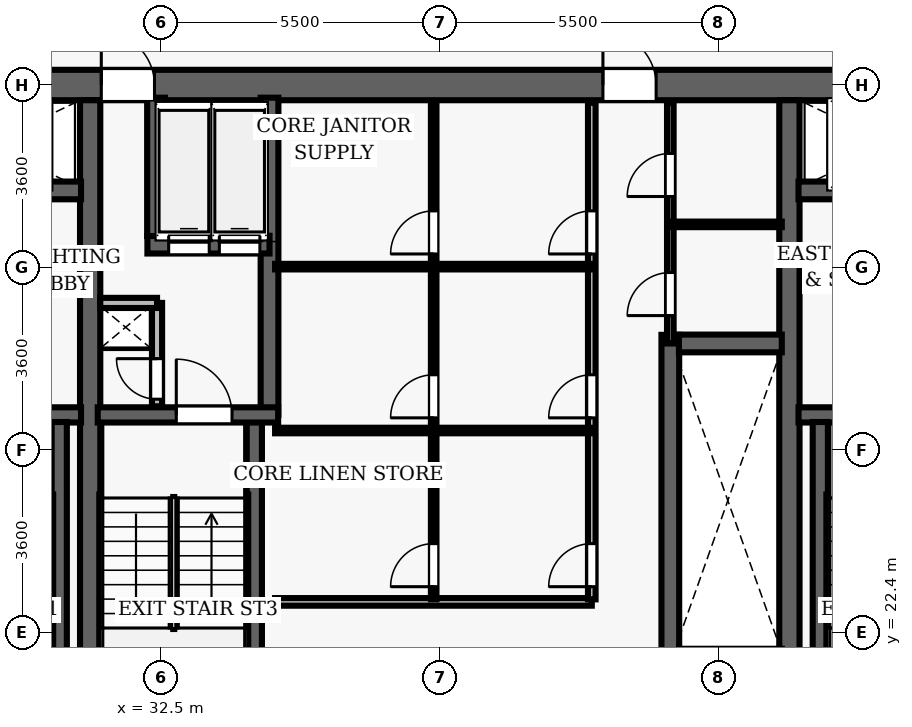
"""IFC4 building model, lengths in metres.
Left out: names, types, materials, properties, quantities, classifications, styles, units other than length and angle.
Written with IfcOpenShell. Run it as: python <this file> out.ifc"""

import sys

from ifc_helpers import new_model, si_unit, direction, frame, frame_2d, origin, place, context, subcontext, project, spatial, rectangle, extrude, element, fill, save


model = new_model("IFC4")
c1 = context("Model", 3, precision=1e-05, world=origin(), true_north=direction((0.0, 1.0)))
c2 = subcontext(c1, "Body", "Model", "MODEL_VIEW")
j1 = project(units=[si_unit("LENGTHUNIT", "METRE"), si_unit("PLANEANGLEUNIT", "RADIAN")], contexts=[c1])
p1 = place(None, origin())
s1 = spatial("IfcSite", under=j1, at=p1, CompositionType="ELEMENT")
p2 = place(p1, origin())
s2 = spatial("IfcBuilding", under=s1, at=p2, CompositionType="ELEMENT")
p3 = place(p2, frame((0.0, 0.0, 130.8)))
s3 = spatial("IfcBuildingStorey", under=s2, at=p3, CompositionType="ELEMENT", Elevation=130.8)
p4 = place(p3, frame((26.7, 33.2, 0.0), z_axis=(0.0, 0.0, 1.0), x_axis=(1.0, 0.0, 0.0)))
e1 = element("IfcWall", 1, at=p4, inside=s3, PredefinedType="SHEAR", context=c2, shape_type="SweptSolid", body=[
    extrude(rectangle(XDim=22.6, YDim=0.6, at=frame_2d((11.3, 0.0))), origin(), (0.0, 0.0, 1.0), 3.5),
])
p5 = place(p4, frame((4.62, 0.0, 0.0)))
e2 = element("IfcOpeningElement", 2, at=p5, cuts=e1, PredefinedType="OPENING", context=c2, shape_type="SweptSolid", body=[
    extrude(rectangle(XDim=1.05, YDim=2.15, at=frame_2d((0.525, 1.075))), frame((0.0, 0.31, 0.0), z_axis=(0.0, -1.0, 0.0), x_axis=(1.0, 0.0, 0.0)), (0.0, 0.0, 1.0), 0.62),
])
p6 = place(p4, frame((14.52, 0.0, 0.0)))
e3 = element("IfcOpeningElement", 3, at=p6, cuts=e1, PredefinedType="OPENING", context=c2, shape_type="SweptSolid", body=[
    extrude(rectangle(XDim=1.05, YDim=2.15, at=frame_2d((0.525, 1.075))), frame((0.0, 0.31, 0.0), z_axis=(0.0, -1.0, 0.0), x_axis=(1.0, 0.0, 0.0)), (0.0, 0.0, 1.0), 0.62),
])
for number, where, z_axis, x_axis in (
    (4, (31.1, 19.1, 0.0), (0.0, 0.0, 1.0), (0.0, 1.0, 0.0)),
    (5, (44.9, 19.1, 0.0), (0.0, 0.0, 1.0), (0.0, 1.0, 0.0)),
):
    element("IfcWall", number, at=place(p3, frame(where, z_axis=z_axis, x_axis=x_axis)), inside=s3, PredefinedType="SHEAR", context=c2, shape_type="SweptSolid", body=[
        extrude(rectangle(XDim=13.8, YDim=0.4, at=frame_2d((6.9, 0.0))), origin(), (0.0, 0.0, 1.0), 3.5),
    ])
p7 = place(p3, frame((27.25, 26.69, 0.0), z_axis=(0.0, 0.0, 1.0), x_axis=(1.0, 0.0, 0.0)))
e6 = element("IfcWall", 6, at=p7, inside=s3, PredefinedType="SHEAR", context=c2, shape_type="SweptSolid", body=[
    extrude(rectangle(XDim=3.67, YDim=0.3, at=frame_2d((1.835, 0.0))), origin(), (0.0, 0.0, 1.0), 3.5),
])
p8 = place(p7, frame((1.05, 0.0, 0.0)))
e7 = element("IfcOpeningElement", 7, at=p8, cuts=e6, PredefinedType="OPENING", context=c2, shape_type="SweptSolid", body=[
    extrude(rectangle(XDim=1.1, YDim=2.15, at=frame_2d((0.55, 1.075))), frame((0.0, 0.16, 0.0), z_axis=(0.0, -1.0, 0.0), x_axis=(1.0, 0.0, 0.0)), (0.0, 0.0, 1.0), 0.32),
])
p9 = place(p3, frame((30.49, 19.05, 0.0), z_axis=(0.0, 0.0, 1.0), x_axis=(0.0, 1.0, 0.0)))
e8 = element("IfcWall", 8, at=p9, inside=s3, PredefinedType="SHEAR", context=c2, shape_type="SweptSolid", body=[
    extrude(rectangle(XDim=7.5, YDim=0.3, at=frame_2d((3.75, 0.0))), origin(), (0.0, 0.0, 1.0), 3.5),
])
p10 = place(p3, frame((27.25, 31.12, 0.0), z_axis=(0.0, 0.0, 1.0), x_axis=(1.0, 0.0, 0.0)))
e9 = element("IfcWall", 9, at=p10, inside=s3, PredefinedType="SHEAR", context=c2, shape_type="SweptSolid", body=[
    extrude(rectangle(XDim=3.67, YDim=0.35, at=frame_2d((1.835, 0.0))), origin(), (0.0, 0.0, 1.0), 2.675),
])
p11 = place(p10, frame((1.25, 0.0, 0.0)))
e10 = element("IfcOpeningElement", 10, at=p11, cuts=e9, PredefinedType="OPENING", context=c2, shape_type="SweptSolid", body=[
    extrude(rectangle(XDim=1.1, YDim=2.15, at=frame_2d((0.55, 1.075))), frame((0.0, 0.185, 0.0), z_axis=(0.0, -1.0, 0.0), x_axis=(1.0, 0.0, 0.0)), (0.0, 0.0, 1.0), 0.37),
])
p12 = place(p3, frame((45.08, 26.69, 0.0), z_axis=(0.0, 0.0, 1.0), x_axis=(1.0, 0.0, 0.0)))
e11 = element("IfcWall", 11, at=p12, inside=s3, PredefinedType="SHEAR", context=c2, shape_type="SweptSolid", body=[
    extrude(rectangle(XDim=3.67, YDim=0.3, at=frame_2d((1.835, 0.0))), origin(), (0.0, 0.0, 1.0), 3.5),
])
p13 = place(p12, frame((1.05, 0.0, 0.0)))
e12 = element("IfcOpeningElement", 12, at=p13, cuts=e11, PredefinedType="OPENING", context=c2, shape_type="SweptSolid", body=[
    extrude(rectangle(XDim=1.1, YDim=2.15, at=frame_2d((0.55, 1.075))), frame((0.0, 0.16, 0.0), z_axis=(0.0, -1.0, 0.0), x_axis=(1.0, 0.0, 0.0)), (0.0, 0.0, 1.0), 0.32),
])
p14 = place(p3, frame((45.51, 19.05, 0.0), z_axis=(0.0, 0.0, 1.0), x_axis=(0.0, 1.0, 0.0)))
e13 = element("IfcWall", 13, at=p14, inside=s3, PredefinedType="SHEAR", context=c2, shape_type="SweptSolid", body=[
    extrude(rectangle(XDim=7.5, YDim=0.3, at=frame_2d((3.75, 0.0))), origin(), (0.0, 0.0, 1.0), 3.5),
])
p15 = place(p3, frame((45.08, 31.12, 0.0), z_axis=(0.0, 0.0, 1.0), x_axis=(1.0, 0.0, 0.0)))
e14 = element("IfcWall", 14, at=p15, inside=s3, PredefinedType="SHEAR", context=c2, shape_type="SweptSolid", body=[
    extrude(rectangle(XDim=3.67, YDim=0.35, at=frame_2d((1.835, 0.0))), origin(), (0.0, 0.0, 1.0), 2.675),
])
p16 = place(p15, frame((1.25, 0.0, 0.0)))
e15 = element("IfcOpeningElement", 15, at=p16, cuts=e14, PredefinedType="OPENING", context=c2, shape_type="SweptSolid", body=[
    extrude(rectangle(XDim=1.1, YDim=2.15, at=frame_2d((0.55, 1.075))), frame((0.0, 0.185, 0.0), z_axis=(0.0, -1.0, 0.0), x_axis=(1.0, 0.0, 0.0)), (0.0, 0.0, 1.0), 0.37),
])
p17 = place(p3, frame((34.34, 19.05, 0.0), z_axis=(0.0, 0.0, 1.0), x_axis=(0.0, 1.0, 0.0)))
e16 = element("IfcWall", 16, at=p17, inside=s3, PredefinedType="SHEAR", context=c2, shape_type="SweptSolid", body=[
    extrude(rectangle(XDim=7.5, YDim=0.3, at=frame_2d((3.75, 0.0))), origin(), (0.0, 0.0, 1.0), 3.5),
])
p18 = place(p3, frame((34.64, 26.69, 0.0), z_axis=(0.0, 0.0, 1.0), x_axis=(0.0, 1.0, 0.0)))
e17 = element("IfcWall", 17, at=p18, inside=s3, PredefinedType="SHEAR", context=c2, shape_type="SweptSolid", body=[
    extrude(rectangle(XDim=6.26, YDim=0.35, at=frame_2d((3.13, 0.0))), origin(), (0.0, 0.0, 1.0), 3.5),
])
p19 = place(p3, frame((31.25, 26.69, 0.0), z_axis=(0.0, 0.0, 1.0), x_axis=(1.0, 0.0, 0.0)))
e18 = element("IfcWall", 18, at=p19, inside=s3, PredefinedType="SHEAR", context=c2, shape_type="SweptSolid", body=[
    extrude(rectangle(XDim=3.56, YDim=0.3, at=frame_2d((1.78, 0.0))), origin(), (0.0, 0.0, 1.0), 3.5),
])
p20 = place(p19, frame((1.55, 0.0, 0.0)))
e19 = element("IfcOpeningElement", 19, at=p20, cuts=e18, PredefinedType="OPENING", context=c2, shape_type="SweptSolid", body=[
    extrude(rectangle(XDim=1.1, YDim=2.15, at=frame_2d((0.55, 1.075))), frame((0.0, 0.16, 0.0), z_axis=(0.0, -1.0, 0.0), x_axis=(1.0, 0.0, 0.0)), (0.0, 0.0, 1.0), 0.32),
])
p21 = place(p3, frame((32.23, 30.05, 0.0), z_axis=(0.0, 0.0, 1.0), x_axis=(1.0, 0.0, 0.0)))
e20 = element("IfcWall", 20, at=p21, inside=s3, PredefinedType="SHEAR", context=c2, shape_type="SweptSolid", body=[
    extrude(rectangle(XDim=2.41, YDim=0.35, at=frame_2d((1.205, 0.0))), origin(), (0.0, 0.0, 1.0), 2.675),
])
p22 = place(p21, frame((0.42, 0.0, 0.0)))
e21 = element("IfcOpeningElement", 21, at=p22, cuts=e20, PredefinedType="OPENING", context=c2, shape_type="SweptSolid", body=[
    extrude(rectangle(XDim=0.8, YDim=2.15, at=frame_2d((0.4, 1.075))), frame((0.0, 0.185, 0.0), z_axis=(0.0, -1.0, 0.0), x_axis=(1.0, 0.0, 0.0)), (0.0, 0.0, 1.0), 0.37),
])
p23 = place(p21, frame((1.42, 0.0, 0.0)))
e22 = element("IfcOpeningElement", 22, at=p23, cuts=e20, PredefinedType="OPENING", context=c2, shape_type="SweptSolid", body=[
    extrude(rectangle(XDim=0.8, YDim=2.15, at=frame_2d((0.4, 1.075))), frame((0.0, 0.185, 0.0), z_axis=(0.0, -1.0, 0.0), x_axis=(1.0, 0.0, 0.0)), (0.0, 0.0, 1.0), 0.37),
])
p24 = place(p3, frame((32.4, 30.22, 0.0), z_axis=(0.0, 0.0, 1.0), x_axis=(0.0, 1.0, 0.0)))
e23 = element("IfcWall", 23, at=p24, inside=s3, PredefinedType="SHEAR", context=c2, shape_type="SweptSolid", body=[
    extrude(rectangle(XDim=2.73, YDim=0.35, at=frame_2d((1.365, 0.0))), origin(), (0.0, 0.0, 1.0), 2.675),
])
p25 = place(p3, frame((32.42, 26.86, 0.0), z_axis=(0.0, 0.0, 1.0), x_axis=(0.0, 1.0, 0.0)))
e24 = element("IfcWall", 24, at=p25, inside=s3, PredefinedType="PARTITIONING", context=c2, shape_type="SweptSolid", body=[
    extrude(rectangle(XDim=2.04, YDim=0.2, at=frame_2d((1.02, 0.0))), origin(), (0.0, 0.0, 1.0), 2.675),
])
p26 = place(p25, frame((0.14, 0.0, 0.0)))
e25 = element("IfcOpeningElement", 25, at=p26, cuts=e24, PredefinedType="OPENING", context=c2, shape_type="SweptSolid", body=[
    extrude(rectangle(XDim=0.8, YDim=2.05, at=frame_2d((0.4, 1.025))), frame((0.0, 0.11, 0.0), z_axis=(0.0, -1.0, 0.0), x_axis=(1.0, 0.0, 0.0)), (0.0, 0.0, 1.0), 0.22),
])
p27 = place(p3, frame((31.3, 28.9, 0.0), z_axis=(0.0, 0.0, 1.0), x_axis=(1.0, 0.0, 0.0)))
e26 = element("IfcWall", 26, at=p27, inside=s3, PredefinedType="PARTITIONING", context=c2, shape_type="SweptSolid", body=[
    extrude(rectangle(XDim=1.12, YDim=0.2, at=frame_2d((0.56, 0.0))), origin(), (0.0, 0.0, 1.0), 2.675),
])
p28 = place(p3, frame((42.55, 21.73, 0.0), z_axis=(0.0, 0.0, 1.0), x_axis=(0.0, 1.0, 0.0)))
e27 = element("IfcWall", 27, at=p28, inside=s3, PredefinedType="SHEAR", context=c2, shape_type="SweptSolid", body=[
    extrude(rectangle(XDim=6.54, YDim=0.35, at=frame_2d((3.27, 0.0))), origin(), (0.0, 0.0, 1.0), 2.675),
])
p29 = place(p3, frame((42.72, 28.1, 0.0), z_axis=(0.0, 0.0, 1.0), x_axis=(1.0, 0.0, 0.0)))
e28 = element("IfcWall", 28, at=p29, inside=s3, PredefinedType="SHEAR", context=c2, shape_type="SweptSolid", body=[
    extrude(rectangle(XDim=2.03, YDim=0.35, at=frame_2d((1.015, 0.0))), origin(), (0.0, 0.0, 1.0), 2.675),
])
p30 = place(p3, frame((34.75, 23.0, 0.0), z_axis=(0.0, 0.0, 1.0), x_axis=(1.0, 0.0, 0.0)))
e29 = element("IfcWall", 29, at=p30, inside=s3, PredefinedType="PARTITIONING", context=c2, shape_type="SweptSolid", body=[
    extrude(rectangle(XDim=6.25, YDim=0.15, at=frame_2d((3.125, 0.0))), origin(), (0.0, 0.0, 1.0), 2.675),
])
p31 = place(p3, frame((41.0, 23.05, 0.0), z_axis=(0.0, 0.0, 1.0), x_axis=(0.0, 1.0, 0.0)))
e30 = element("IfcWall", 30, at=p31, inside=s3, PredefinedType="PARTITIONING", context=c2, shape_type="SweptSolid", body=[
    extrude(rectangle(XDim=9.8, YDim=0.15, at=frame_2d((4.9, 0.0))), origin(), (0.0, 0.0, 1.0), 2.675),
])
p32 = place(p31, frame((0.25, 0.0, 0.0)))
e31 = element("IfcOpeningElement", 31, at=p32, cuts=e30, PredefinedType="OPENING", context=c2, shape_type="SweptSolid", body=[
    extrude(rectangle(XDim=0.85, YDim=2.1, at=frame_2d((0.425, 1.05))), frame((0.0, 0.085, 0.0), z_axis=(0.0, -1.0, 0.0), x_axis=(1.0, 0.0, 0.0)), (0.0, 0.0, 1.0), 0.17),
])
p33 = place(p31, frame((3.582, 0.0, 0.0)))
e32 = element("IfcOpeningElement", 32, at=p33, cuts=e30, PredefinedType="OPENING", context=c2, shape_type="SweptSolid", body=[
    extrude(rectangle(XDim=0.85, YDim=2.1, at=frame_2d((0.425, 1.05))), frame((0.0, 0.085, 0.0), z_axis=(0.0, -1.0, 0.0), x_axis=(1.0, 0.0, 0.0)), (0.0, 0.0, 1.0), 0.17),
])
p34 = place(p31, frame((6.816, 0.0, 0.0)))
e33 = element("IfcOpeningElement", 33, at=p34, cuts=e30, PredefinedType="OPENING", context=c2, shape_type="SweptSolid", body=[
    extrude(rectangle(XDim=0.85, YDim=2.1, at=frame_2d((0.425, 1.05))), frame((0.0, 0.085, 0.0), z_axis=(0.0, -1.0, 0.0), x_axis=(1.0, 0.0, 0.0)), (0.0, 0.0, 1.0), 0.17),
])
p35 = place(p3, frame((37.88, 23.05, 0.0), z_axis=(0.0, 0.0, 1.0), x_axis=(0.0, 1.0, 0.0)))
e34 = element("IfcWall", 34, at=p35, inside=s3, PredefinedType="PARTITIONING", context=c2, shape_type="SweptSolid", body=[
    extrude(rectangle(XDim=9.8, YDim=0.11, at=frame_2d((4.9, 0.0))), origin(), (0.0, 0.0, 1.0), 2.675),
])
p36 = place(p35, frame((0.25, 0.0, 0.0)))
e35 = element("IfcOpeningElement", 35, at=p36, cuts=e34, PredefinedType="OPENING", context=c2, shape_type="SweptSolid", body=[
    extrude(rectangle(XDim=0.85, YDim=2.1, at=frame_2d((0.425, 1.05))), frame((0.0, 0.065, 0.0), z_axis=(0.0, -1.0, 0.0), x_axis=(1.0, 0.0, 0.0)), (0.0, 0.0, 1.0), 0.13),
])
p37 = place(p35, frame((3.582, 0.0, 0.0)))
e36 = element("IfcOpeningElement", 36, at=p37, cuts=e34, PredefinedType="OPENING", context=c2, shape_type="SweptSolid", body=[
    extrude(rectangle(XDim=0.85, YDim=2.1, at=frame_2d((0.425, 1.05))), frame((0.0, 0.065, 0.0), z_axis=(0.0, -1.0, 0.0), x_axis=(1.0, 0.0, 0.0)), (0.0, 0.0, 1.0), 0.13),
])
p38 = place(p35, frame((6.816, 0.0, 0.0)))
e37 = element("IfcOpeningElement", 37, at=p38, cuts=e34, PredefinedType="OPENING", context=c2, shape_type="SweptSolid", body=[
    extrude(rectangle(XDim=0.85, YDim=2.1, at=frame_2d((0.425, 1.05))), frame((0.0, 0.065, 0.0), z_axis=(0.0, -1.0, 0.0), x_axis=(1.0, 0.0, 0.0)), (0.0, 0.0, 1.0), 0.13),
])
for number, where, z_axis, x_axis in (
    (38, (34.75, 26.382, 0.0), (0.0, 0.0, 1.0), (1.0, 0.0, 0.0)),
    (39, (34.75, 29.616, 0.0), (0.0, 0.0, 1.0), (1.0, 0.0, 0.0)),
):
    element("IfcWall", number, at=place(p3, frame(where, z_axis=z_axis, x_axis=x_axis)), inside=s3, PredefinedType="PARTITIONING", context=c2, shape_type="SweptSolid", body=[
        extrude(rectangle(XDim=6.25, YDim=0.11, at=frame_2d((3.125, 0.0))), origin(), (0.0, 0.0, 1.0), 2.675),
    ])
p39 = place(p3, frame((42.55, 28.1, 0.0), z_axis=(0.0, 0.0, 1.0), x_axis=(0.0, 1.0, 0.0)))
e40 = element("IfcWall", 40, at=p39, inside=s3, PredefinedType="PARTITIONING", context=c2, shape_type="SweptSolid", body=[
    extrude(rectangle(XDim=4.75, YDim=0.13, at=frame_2d((2.375, 0.0))), origin(), (0.0, 0.0, 1.0), 2.675),
])
p40 = place(p39, frame((0.55, 0.0, 0.0)))
e41 = element("IfcOpeningElement", 41, at=p40, cuts=e40, PredefinedType="OPENING", context=c2, shape_type="SweptSolid", body=[
    extrude(rectangle(XDim=0.85, YDim=2.1, at=frame_2d((0.425, 1.05))), frame((0.0, 0.075, 0.0), z_axis=(0.0, -1.0, 0.0), x_axis=(1.0, 0.0, 0.0)), (0.0, 0.0, 1.0), 0.15),
])
p41 = place(p39, frame((2.9, 0.0, 0.0)))
e42 = element("IfcOpeningElement", 42, at=p41, cuts=e40, PredefinedType="OPENING", context=c2, shape_type="SweptSolid", body=[
    extrude(rectangle(XDim=0.85, YDim=2.1, at=frame_2d((0.425, 1.05))), frame((0.0, 0.075, 0.0), z_axis=(0.0, -1.0, 0.0), x_axis=(1.0, 0.0, 0.0)), (0.0, 0.0, 1.0), 0.15),
])
p42 = place(p3, frame((42.55, 30.45, 0.0), z_axis=(0.0, 0.0, 1.0), x_axis=(1.0, 0.0, 0.0)))
e43 = element("IfcWall", 43, at=p42, inside=s3, PredefinedType="PARTITIONING", context=c2, shape_type="SweptSolid", body=[
    extrude(rectangle(XDim=2.2, YDim=0.11, at=frame_2d((1.1, 0.0))), origin(), (0.0, 0.0, 1.0), 2.675),
])
p43 = place(p20, origin())
e44 = element("IfcDoor", 44, at=p43, inside=s3, OperationType="SINGLE_SWING_LEFT", PredefinedType="DOOR", context=c2, shape_type="SweptSolid", body=[
    extrude(rectangle(XDim=1.1, YDim=2.15, at=frame_2d((0.55, 1.075))), frame((0.0, 0.025, 0.0), z_axis=(0.0, -1.0, 0.0), x_axis=(1.0, 0.0, 0.0)), (0.0, 0.0, 1.0), 0.05),
])
fill(e19, e44)
p44 = place(p26, origin())
e45 = element("IfcDoor", 45, at=p44, inside=s3, OperationType="SINGLE_SWING_RIGHT", PredefinedType="DOOR", context=c2, shape_type="SweptSolid", body=[
    extrude(rectangle(XDim=0.8, YDim=2.05, at=frame_2d((0.4, 1.025))), frame((0.0, 0.025, 0.0), z_axis=(0.0, -1.0, 0.0), x_axis=(1.0, 0.0, 0.0)), (0.0, 0.0, 1.0), 0.05),
])
fill(e25, e45)
p45 = place(p5, origin())
e46 = element("IfcDoor", 46, at=p45, inside=s3, OperationType="SINGLE_SWING_LEFT", PredefinedType="DOOR", context=c2, shape_type="SweptSolid", body=[
    extrude(rectangle(XDim=1.05, YDim=2.15, at=frame_2d((0.525, 1.075))), frame((0.0, 0.025, 0.0), z_axis=(0.0, -1.0, 0.0), x_axis=(1.0, 0.0, 0.0)), (0.0, 0.0, 1.0), 0.05),
])
fill(e2, e46)
p46 = place(p6, origin())
e47 = element("IfcDoor", 47, at=p46, inside=s3, OperationType="SINGLE_SWING_LEFT", PredefinedType="DOOR", context=c2, shape_type="SweptSolid", body=[
    extrude(rectangle(XDim=1.05, YDim=2.15, at=frame_2d((0.525, 1.075))), frame((0.0, 0.025, 0.0), z_axis=(0.0, -1.0, 0.0), x_axis=(1.0, 0.0, 0.0)), (0.0, 0.0, 1.0), 0.05),
])
fill(e3, e47)
p47 = place(p32, origin())
e48 = element("IfcDoor", 48, at=p47, inside=s3, OperationType="SINGLE_SWING_LEFT", PredefinedType="DOOR", context=c2, shape_type="SweptSolid", body=[
    extrude(rectangle(XDim=0.85, YDim=2.1, at=frame_2d((0.425, 1.05))), frame((0.0, 0.025, 0.0), z_axis=(0.0, -1.0, 0.0), x_axis=(1.0, 0.0, 0.0)), (0.0, 0.0, 1.0), 0.05),
])
fill(e31, e48)
p48 = place(p36, origin())
e49 = element("IfcDoor", 49, at=p48, inside=s3, OperationType="SINGLE_SWING_LEFT", PredefinedType="DOOR", context=c2, shape_type="SweptSolid", body=[
    extrude(rectangle(XDim=0.85, YDim=2.1, at=frame_2d((0.425, 1.05))), frame((0.0, 0.025, 0.0), z_axis=(0.0, -1.0, 0.0), x_axis=(1.0, 0.0, 0.0)), (0.0, 0.0, 1.0), 0.05),
])
fill(e35, e49)
p49 = place(p33, origin())
e50 = element("IfcDoor", 50, at=p49, inside=s3, OperationType="SINGLE_SWING_LEFT", PredefinedType="DOOR", context=c2, shape_type="SweptSolid", body=[
    extrude(rectangle(XDim=0.85, YDim=2.1, at=frame_2d((0.425, 1.05))), frame((0.0, 0.025, 0.0), z_axis=(0.0, -1.0, 0.0), x_axis=(1.0, 0.0, 0.0)), (0.0, 0.0, 1.0), 0.05),
])
fill(e32, e50)
p50 = place(p37, origin())
e51 = element("IfcDoor", 51, at=p50, inside=s3, OperationType="SINGLE_SWING_LEFT", PredefinedType="DOOR", context=c2, shape_type="SweptSolid", body=[
    extrude(rectangle(XDim=0.85, YDim=2.1, at=frame_2d((0.425, 1.05))), frame((0.0, 0.025, 0.0), z_axis=(0.0, -1.0, 0.0), x_axis=(1.0, 0.0, 0.0)), (0.0, 0.0, 1.0), 0.05),
])
fill(e36, e51)
p51 = place(p34, origin())
e52 = element("IfcDoor", 52, at=p51, inside=s3, OperationType="SINGLE_SWING_LEFT", PredefinedType="DOOR", context=c2, shape_type="SweptSolid", body=[
    extrude(rectangle(XDim=0.85, YDim=2.1, at=frame_2d((0.425, 1.05))), frame((0.0, 0.025, 0.0), z_axis=(0.0, -1.0, 0.0), x_axis=(1.0, 0.0, 0.0)), (0.0, 0.0, 1.0), 0.05),
])
fill(e33, e52)
p52 = place(p38, origin())
e53 = element("IfcDoor", 53, at=p52, inside=s3, OperationType="SINGLE_SWING_LEFT", PredefinedType="DOOR", context=c2, shape_type="SweptSolid", body=[
    extrude(rectangle(XDim=0.85, YDim=2.1, at=frame_2d((0.425, 1.05))), frame((0.0, 0.025, 0.0), z_axis=(0.0, -1.0, 0.0), x_axis=(1.0, 0.0, 0.0)), (0.0, 0.0, 1.0), 0.05),
])
fill(e37, e53)
p53 = place(p40, origin())
e54 = element("IfcDoor", 54, at=p53, inside=s3, OperationType="SINGLE_SWING_LEFT", PredefinedType="DOOR", context=c2, shape_type="SweptSolid", body=[
    extrude(rectangle(XDim=0.85, YDim=2.1, at=frame_2d((0.425, 1.05))), frame((0.0, 0.025, 0.0), z_axis=(0.0, -1.0, 0.0), x_axis=(1.0, 0.0, 0.0)), (0.0, 0.0, 1.0), 0.05),
])
fill(e41, e54)
p54 = place(p41, origin())
e55 = element("IfcDoor", 55, at=p54, inside=s3, OperationType="SINGLE_SWING_LEFT", PredefinedType="DOOR", context=c2, shape_type="SweptSolid", body=[
    extrude(rectangle(XDim=0.85, YDim=2.1, at=frame_2d((0.425, 1.05))), frame((0.0, 0.025, 0.0), z_axis=(0.0, -1.0, 0.0), x_axis=(1.0, 0.0, 0.0)), (0.0, 0.0, 1.0), 0.05),
])
fill(e42, e55)
p55 = place(p22, origin())
e56 = element("IfcDoor", 56, at=p55, inside=s3, OperationType="SLIDING_TO_LEFT", PredefinedType="DOOR", context=c2, shape_type="SweptSolid", body=[
    extrude(rectangle(XDim=0.8, YDim=2.15, at=frame_2d((0.4, 1.075))), frame((0.0, 0.025, 0.0), z_axis=(0.0, -1.0, 0.0), x_axis=(1.0, 0.0, 0.0)), (0.0, 0.0, 1.0), 0.05),
])
fill(e21, e56)
p56 = place(p23, origin())
e57 = element("IfcDoor", 57, at=p56, inside=s3, OperationType="SLIDING_TO_LEFT", PredefinedType="DOOR", context=c2, shape_type="SweptSolid", body=[
    extrude(rectangle(XDim=0.8, YDim=2.15, at=frame_2d((0.4, 1.075))), frame((0.0, 0.025, 0.0), z_axis=(0.0, -1.0, 0.0), x_axis=(1.0, 0.0, 0.0)), (0.0, 0.0, 1.0), 0.05),
])
fill(e22, e57)
save(model, sys.argv[1])
